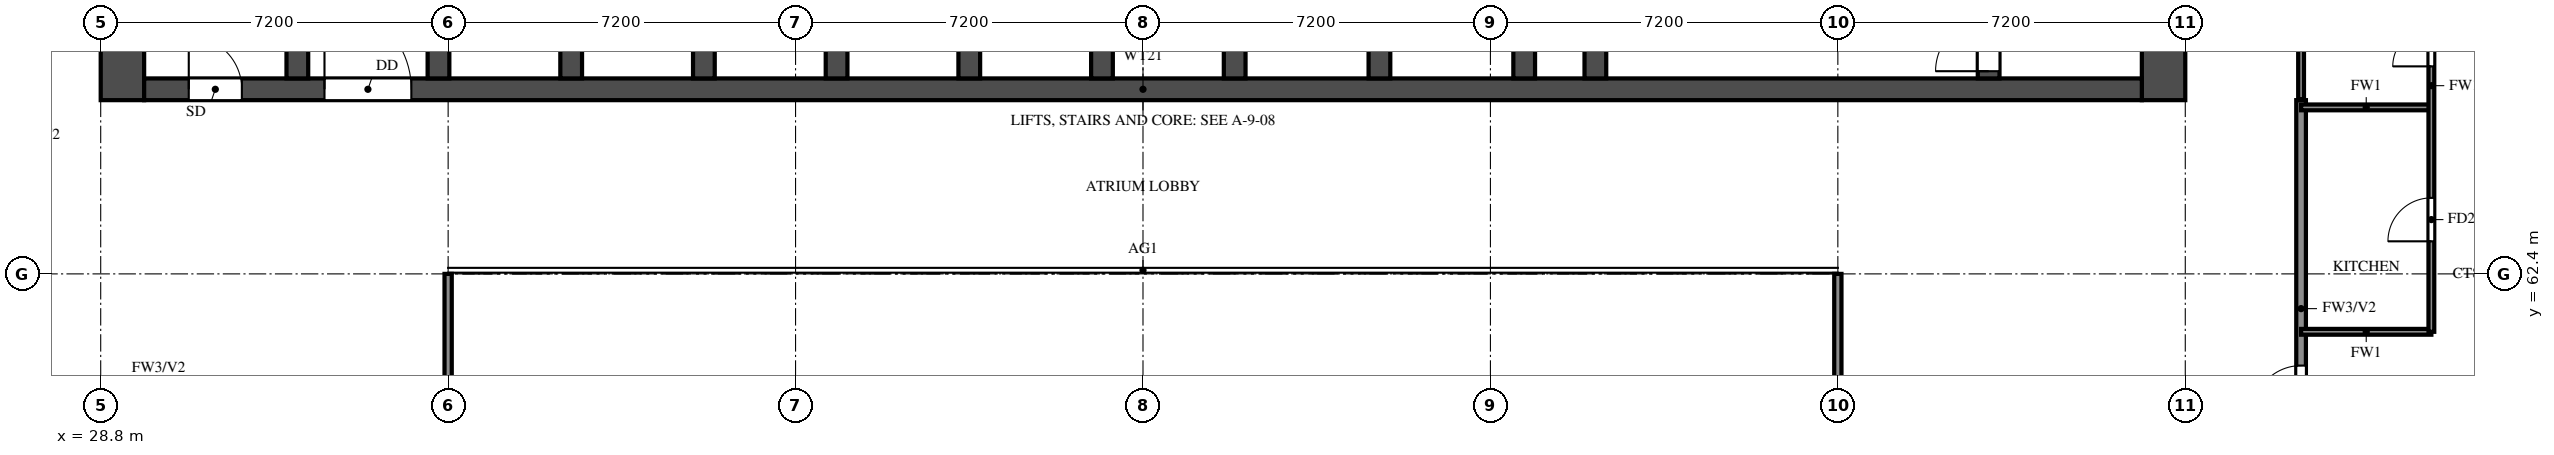
"""IFC4 building model, lengths in metres.
Left out: names, types, materials, properties, quantities, classifications, styles, units other than length and angle.
Written with IfcOpenShell. Run it as: python <this file> out.ifc"""

import sys

from ifc_helpers import new_model, si_unit, direction, frame, frame_2d, origin, place, context, subcontext, project, spatial, rectangle, extrude, element, fill, save


model = new_model("IFC4")
c1 = context("Model", 3, precision=1e-05, world=origin(), true_north=direction((0.0, 1.0)))
c2 = subcontext(c1, "Body", "Model", "MODEL_VIEW")
j1 = project(units=[si_unit("LENGTHUNIT", "METRE"), si_unit("PLANEANGLEUNIT", "RADIAN")], contexts=[c1])
p1 = place(None, origin())
s1 = spatial("IfcSite", under=j1, at=p1, CompositionType="ELEMENT")
p2 = place(p1, origin())
s2 = spatial("IfcBuilding", under=s1, at=p2, CompositionType="ELEMENT")
p3 = place(p2, frame((0.0, 0.0, 37.5)))
s3 = spatial("IfcBuildingStorey", under=s2, at=p3, CompositionType="ELEMENT", Elevation=37.5)
for number, where, z_axis, x_axis in (
    (1, (29.25, 66.0, 0.0), (0.0, 0.0, 1.0), (0.0, 1.0, 0.0)),
    (2, (71.55, 66.0, 0.0), (0.0, 0.0, 1.0), (0.0, 1.0, 0.0)),
):
    element("IfcWall", number, at=place(p3, frame(where, z_axis=z_axis, x_axis=x_axis)), inside=s3, PredefinedType="SHEAR", context=c2, shape_type="SweptSolid", body=[
        extrude(rectangle(XDim=12.0, YDim=0.9, at=frame_2d((6.0, 0.0))), origin(), (0.0, 0.0, 1.0), 3.18),
    ])
p4 = place(p3, frame((29.7, 66.225, 0.0), z_axis=(0.0, 0.0, 1.0), x_axis=(1.0, 0.0, 0.0)))
e3 = element("IfcWall", 3, at=p4, inside=s3, PredefinedType="SHEAR", context=c2, shape_type="SweptSolid", body=[
    extrude(rectangle(XDim=41.4, YDim=0.45, at=frame_2d((20.7, 0.0))), origin(), (0.0, 0.0, 1.0), 3.18),
])
p5 = place(p4, frame((0.925, 0.0, 0.0)))
e4 = element("IfcOpeningElement", 4, at=p5, cuts=e3, PredefinedType="OPENING", context=c2, shape_type="SweptSolid", body=[
    extrude(rectangle(XDim=1.1, YDim=2.1, at=frame_2d((0.55, 1.05))), frame((0.0, 0.235, 0.0), z_axis=(0.0, -1.0, 0.0), x_axis=(1.0, 0.0, 0.0)), (0.0, 0.0, 1.0), 0.47),
])
p6 = place(p4, frame((3.738, 0.0, 0.0)))
e5 = element("IfcOpeningElement", 5, at=p6, cuts=e3, PredefinedType="OPENING", context=c2, shape_type="SweptSolid", body=[
    extrude(rectangle(XDim=1.8, YDim=2.1, at=frame_2d((0.9, 1.05))), frame((0.0, 0.235, 0.0), z_axis=(0.0, -1.0, 0.0), x_axis=(1.0, 0.0, 0.0)), (0.0, 0.0, 1.0), 0.47),
])
p7 = place(p3, frame((32.875, 66.45, 0.0), z_axis=(0.0, 0.0, 1.0), x_axis=(0.0, 1.0, 0.0)))
e6 = element("IfcWall", 6, at=p7, inside=s3, PredefinedType="SHEAR", context=c2, shape_type="SweptSolid", body=[
    extrude(rectangle(XDim=10.65, YDim=0.45, at=frame_2d((5.325, 0.0))), origin(), (0.0, 0.0, 1.0), 3.18),
])
p8 = place(p3, frame((67.925, 66.45, 0.0), z_axis=(0.0, 0.0, 1.0), x_axis=(0.0, 1.0, 0.0)))
e7 = element("IfcWall", 7, at=p8, inside=s3, PredefinedType="SHEAR", context=c2, shape_type="SweptSolid", body=[
    extrude(rectangle(XDim=10.65, YDim=0.45, at=frame_2d((5.325, 0.0))), origin(), (0.0, 0.0, 1.0), 3.18),
])
p9 = place(p8, frame((0.15, 0.0, 0.0)))
e8 = element("IfcOpeningElement", 8, at=p9, cuts=e7, PredefinedType="OPENING", context=c2, shape_type="SweptSolid", body=[
    extrude(rectangle(XDim=1.1, YDim=2.1, at=frame_2d((0.55, 1.05))), frame((0.0, 0.235, 0.0), z_axis=(0.0, -1.0, 0.0), x_axis=(1.0, 0.0, 0.0)), (0.0, 0.0, 1.0), 0.47),
])
p10 = place(p3, frame((59.775, 66.45, 0.0), z_axis=(0.0, 0.0, 1.0), x_axis=(0.0, 1.0, 0.0)))
e9 = element("IfcWall", 9, at=p10, inside=s3, PredefinedType="SHEAR", context=c2, shape_type="SweptSolid", body=[
    extrude(rectangle(XDim=6.025, YDim=0.45, at=frame_2d((3.013, 0.0))), origin(), (0.0, 0.0, 1.0), 3.18),
])
p11 = place(p10, frame((3.85, 0.0, 0.0)))
e10 = element("IfcOpeningElement", 10, at=p11, cuts=e9, PredefinedType="OPENING", context=c2, shape_type="SweptSolid", body=[
    extrude(rectangle(XDim=1.2, YDim=2.1, at=frame_2d((0.6, 1.05))), frame((0.0, 0.235, 0.0), z_axis=(0.0, -1.0, 0.0), x_axis=(1.0, 0.0, 0.0)), (0.0, 0.0, 1.0), 0.47),
])
for number, where, z_axis, x_axis in (
    (11, (35.8, 66.45, 0.0), (0.0, 0.0, 1.0), (0.0, 1.0, 0.0)),
    (12, (38.55, 66.45, 0.0), (0.0, 0.0, 1.0), (0.0, 1.0, 0.0)),
    (13, (41.3, 66.45, 0.0), (0.0, 0.0, 1.0), (0.0, 1.0, 0.0)),
    (14, (44.05, 66.45, 0.0), (0.0, 0.0, 1.0), (0.0, 1.0, 0.0)),
    (15, (46.8, 66.45, 0.0), (0.0, 0.0, 1.0), (0.0, 1.0, 0.0)),
    (16, (49.55, 66.45, 0.0), (0.0, 0.0, 1.0), (0.0, 1.0, 0.0)),
    (17, (52.3, 66.45, 0.0), (0.0, 0.0, 1.0), (0.0, 1.0, 0.0)),
    (18, (55.3, 66.45, 0.0), (0.0, 0.0, 1.0), (0.0, 1.0, 0.0)),
    (19, (58.3, 66.45, 0.0), (0.0, 0.0, 1.0), (0.0, 1.0, 0.0)),
):
    element("IfcWall", number, at=place(p3, frame(where, z_axis=z_axis, x_axis=x_axis)), inside=s3, PredefinedType="SHEAR", context=c2, shape_type="SweptSolid", body=[
        extrude(rectangle(XDim=2.425, YDim=0.45, at=frame_2d((1.212, 0.0))), origin(), (0.0, 0.0, 1.0), 3.18),
    ])
p12 = place(p3, frame((74.4, 56.4, 0.0), z_axis=(0.0, 0.0, 1.0), x_axis=(0.0, 1.0, 0.0)))
e20 = element("IfcWall", 20, at=p12, inside=s3, PredefinedType="SOLIDWALL", context=c2, shape_type="SweptSolid", body=[
    extrude(rectangle(XDim=9.6, YDim=0.2, at=frame_2d((4.8, 0.0))), origin(), (0.0, 0.0, 1.0), 3.18),
])
p13 = place(p12, frame((0.7, 0.0, 0.0)))
e21 = element("IfcOpeningElement", 21, at=p13, cuts=e20, PredefinedType="OPENING", context=c2, shape_type="SweptSolid", body=[
    extrude(rectangle(XDim=1.0, YDim=2.1, at=frame_2d((0.5, 1.05))), frame((0.0, 0.11, 0.0), z_axis=(0.0, -1.0, 0.0), x_axis=(1.0, 0.0, 0.0)), (0.0, 0.0, 1.0), 0.22),
])
p14 = place(p12, frame((3.1, 0.0, 0.0)))
e22 = element("IfcOpeningElement", 22, at=p14, cuts=e20, PredefinedType="OPENING", context=c2, shape_type="SweptSolid", body=[
    extrude(rectangle(XDim=1.0, YDim=2.1, at=frame_2d((0.5, 1.05))), frame((0.0, 0.11, 0.0), z_axis=(0.0, -1.0, 0.0), x_axis=(1.0, 0.0, 0.0)), (0.0, 0.0, 1.0), 0.22),
])
for number, where, z_axis, x_axis in (
    (23, (74.4, 61.2, 0.0), (0.0, 0.0, 1.0), (1.0, 0.0, 0.0)),
    (24, (74.4, 65.85, 0.0), (0.0, 0.0, 1.0), (1.0, 0.0, 0.0)),
):
    element("IfcWall", number, at=place(p3, frame(where, z_axis=z_axis, x_axis=x_axis)), inside=s3, PredefinedType="PARTITIONING", context=c2, shape_type="SweptSolid", body=[
        extrude(rectangle(XDim=2.7, YDim=0.12, at=frame_2d((1.35, 0.0))), origin(), (0.0, 0.0, 1.0), 3.18),
    ])
p15 = place(p3, frame((74.4, 66.02, 0.0), z_axis=(0.0, 0.0, 1.0), x_axis=(0.0, 1.0, 0.0)))
e25 = element("IfcWall", 25, at=p15, inside=s3, PredefinedType="PARTITIONING", context=c2, shape_type="SweptSolid", body=[
    extrude(rectangle(XDim=2.33, YDim=0.12, at=frame_2d((1.165, 0.0))), origin(), (0.0, 0.0, 1.0), 3.18),
])
p16 = place(p3, frame((77.1, 61.2, 0.0), z_axis=(0.0, 0.0, 1.0), x_axis=(0.0, 1.0, 0.0)))
e26 = element("IfcWall", 26, at=p16, inside=s3, PredefinedType="PARTITIONING", context=c2, shape_type="SweptSolid", body=[
    extrude(rectangle(XDim=12.0, YDim=0.12, at=frame_2d((6.0, 0.0))), origin(), (0.0, 0.0, 1.0), 3.18),
])
p17 = place(p16, frame((1.875, 0.0, 0.0)))
e27 = element("IfcOpeningElement", 27, at=p17, cuts=e26, PredefinedType="OPENING", context=c2, shape_type="SweptSolid", body=[
    extrude(rectangle(XDim=0.9, YDim=2.1, at=frame_2d((0.45, 1.05))), frame((0.0, 0.07, 0.0), z_axis=(0.0, -1.0, 0.0), x_axis=(1.0, 0.0, 0.0)), (0.0, 0.0, 1.0), 0.14),
])
p18 = place(p16, frame((5.5, 0.0, 0.0)))
e28 = element("IfcOpeningElement", 28, at=p18, cuts=e26, PredefinedType="OPENING", context=c2, shape_type="SweptSolid", body=[
    extrude(rectangle(XDim=0.8, YDim=2.1, at=frame_2d((0.4, 1.05))), frame((0.0, 0.07, 0.0), z_axis=(0.0, -1.0, 0.0), x_axis=(1.0, 0.0, 0.0)), (0.0, 0.0, 1.0), 0.14),
])
p19 = place(p16, frame((9.125, 0.0, 0.0)))
e29 = element("IfcOpeningElement", 29, at=p19, cuts=e26, PredefinedType="OPENING", context=c2, shape_type="SweptSolid", body=[
    extrude(rectangle(XDim=0.9, YDim=2.1, at=frame_2d((0.45, 1.05))), frame((0.0, 0.07, 0.0), z_axis=(0.0, -1.0, 0.0), x_axis=(1.0, 0.0, 0.0)), (0.0, 0.0, 1.0), 0.14),
])
for number, where, z_axis, x_axis in (
    (30, (36.0, 48.0, 0.0), (0.0, 0.0, 1.0), (0.0, 1.0, 0.0)),
    (31, (64.8, 48.0, 0.0), (0.0, 0.0, 1.0), (0.0, 1.0, 0.0)),
):
    element("IfcWall", number, at=place(p3, frame(where, z_axis=z_axis, x_axis=x_axis)), inside=s3, PredefinedType="SOLIDWALL", context=c2, shape_type="SweptSolid", body=[
        extrude(rectangle(XDim=14.4, YDim=0.15, at=frame_2d((7.2, 0.0))), origin(), (0.0, 0.0, 1.0), 2.28),
    ])
p20 = place(p5, origin())
e32 = element("IfcDoor", 32, at=p20, inside=s3, OperationType="SINGLE_SWING_LEFT", PredefinedType="DOOR", context=c2, shape_type="SweptSolid", body=[
    extrude(rectangle(XDim=1.1, YDim=2.1, at=frame_2d((0.55, 1.05))), frame((0.0, 0.025, 0.0), z_axis=(0.0, -1.0, 0.0), x_axis=(1.0, 0.0, 0.0)), (0.0, 0.0, 1.0), 0.05),
])
fill(e4, e32)
p21 = place(p9, origin())
e33 = element("IfcDoor", 33, at=p21, inside=s3, OperationType="SINGLE_SWING_LEFT", PredefinedType="DOOR", context=c2, shape_type="SweptSolid", body=[
    extrude(rectangle(XDim=1.1, YDim=2.1, at=frame_2d((0.55, 1.05))), frame((0.0, 0.025, 0.0), z_axis=(0.0, -1.0, 0.0), x_axis=(1.0, 0.0, 0.0)), (0.0, 0.0, 1.0), 0.05),
])
fill(e8, e33)
p22 = place(p6, origin())
e34 = element("IfcDoor", 34, at=p22, inside=s3, OperationType="DOUBLE_DOOR_SINGLE_SWING", PredefinedType="DOOR", context=c2, shape_type="SweptSolid", body=[
    extrude(rectangle(XDim=1.8, YDim=2.1, at=frame_2d((0.9, 1.05))), frame((0.0, 0.025, 0.0), z_axis=(0.0, -1.0, 0.0), x_axis=(1.0, 0.0, 0.0)), (0.0, 0.0, 1.0), 0.05),
])
fill(e5, e34)
p23 = place(p14, origin())
e35 = element("IfcDoor", 35, at=p23, inside=s3, OperationType="SINGLE_SWING_RIGHT", PredefinedType="DOOR", context=c2, shape_type="SweptSolid", body=[
    extrude(rectangle(XDim=1.0, YDim=2.1, at=frame_2d((0.5, 1.05))), frame((0.0, 0.025, 0.0), z_axis=(0.0, -1.0, 0.0), x_axis=(1.0, 0.0, 0.0)), (0.0, 0.0, 1.0), 0.05),
])
fill(e22, e35)
p24 = place(p17, origin())
e36 = element("IfcDoor", 36, at=p24, inside=s3, OperationType="SINGLE_SWING_RIGHT", PredefinedType="DOOR", context=c2, shape_type="SweptSolid", body=[
    extrude(rectangle(XDim=0.9, YDim=2.1, at=frame_2d((0.45, 1.05))), frame((0.0, 0.025, 0.0), z_axis=(0.0, -1.0, 0.0), x_axis=(1.0, 0.0, 0.0)), (0.0, 0.0, 1.0), 0.05),
])
fill(e27, e36)
p25 = place(p18, origin())
e37 = element("IfcDoor", 37, at=p25, inside=s3, OperationType="SINGLE_SWING_LEFT", PredefinedType="DOOR", context=c2, shape_type="SweptSolid", body=[
    extrude(rectangle(XDim=0.8, YDim=2.1, at=frame_2d((0.4, 1.05))), frame((0.0, 0.025, 0.0), z_axis=(0.0, -1.0, 0.0), x_axis=(1.0, 0.0, 0.0)), (0.0, 0.0, 1.0), 0.05),
])
fill(e28, e37)
save(model, sys.argv[1])
